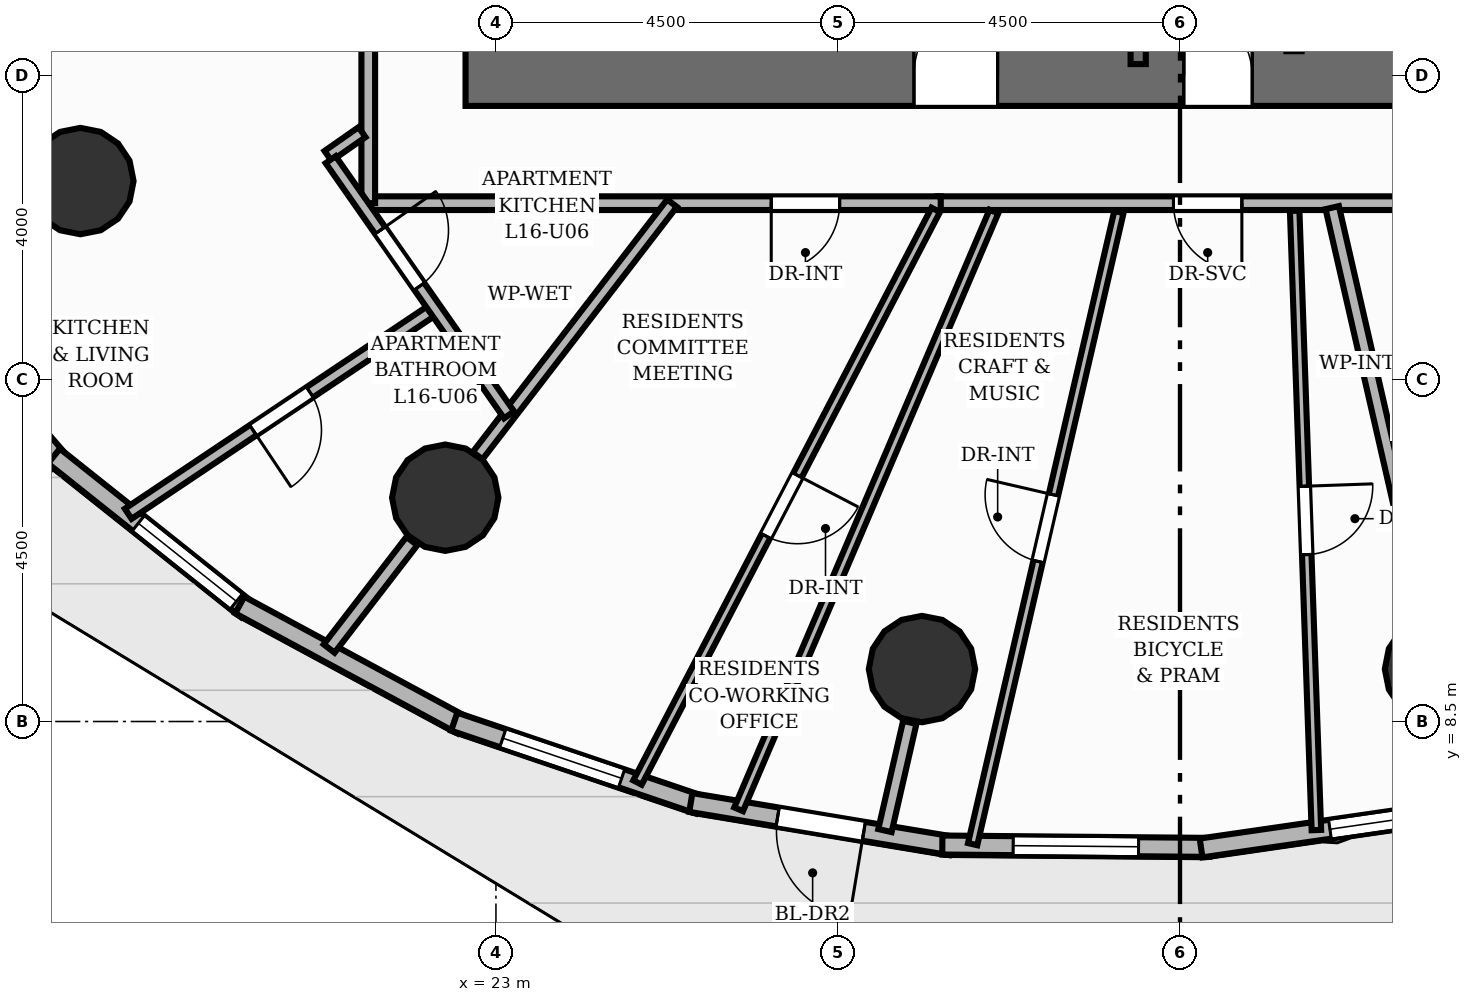
"""IFC4 building model, lengths in metres.
Left out: names, types, materials, properties, quantities, classifications, styles, units other than length and angle.
Written with IfcOpenShell. Run it as: python <this file> out.ifc"""

import sys

from ifc_helpers import new_model, si_unit, direction, frame, frame_2d, origin, origin_2d, place, context, subcontext, project, spatial, rectangle, circle, extrude, element, fill, save


model = new_model("IFC4")
c1 = context("Model", 3, precision=1e-05, world=origin(), true_north=direction((0.0, 1.0)))
c2 = subcontext(c1, "Body", "Model", "MODEL_VIEW")
j1 = project(units=[si_unit("LENGTHUNIT", "METRE"), si_unit("PLANEANGLEUNIT", "RADIAN")], contexts=[c1])
p1 = place(None, origin())
s1 = spatial("IfcSite", under=j1, at=p1, CompositionType="ELEMENT")
p2 = place(p1, origin())
s2 = spatial("IfcBuilding", under=s1, at=p2, CompositionType="ELEMENT")
p3 = place(p2, frame((0.0, 0.0, 56.8)))
s3 = spatial("IfcBuildingStorey", under=s2, at=p3, CompositionType="ELEMENT", Elevation=56.8)
p4 = place(p3, frame((22.6, 17.0, 0.0), z_axis=(0.0, 0.0, 1.0), x_axis=(1.0, 0.0, 0.0)))
e1 = element("IfcWall", 1, at=p4, inside=s3, PredefinedType="SHEAR", context=c2, shape_type="SweptSolid", body=[
    extrude(rectangle(XDim=18.8, YDim=0.8, at=frame_2d((9.4, 0.0))), origin(), (0.0, 0.0, 1.0), 3.2),
])
p5 = place(p4, frame((5.9, 0.0, 0.0)))
e2 = element("IfcOpeningElement", 2, at=p5, cuts=e1, PredefinedType="OPENING", context=c2, shape_type="SweptSolid", body=[
    extrude(rectangle(XDim=1.1, YDim=2.15, at=frame_2d((0.55, 1.075))), frame((0.0, 0.41, 0.0), z_axis=(0.0, -1.0, 0.0), x_axis=(1.0, 0.0, 0.0)), (0.0, 0.0, 1.0), 0.82),
])
p6 = place(p4, frame((9.45, 0.0, 0.0)))
e3 = element("IfcOpeningElement", 3, at=p6, cuts=e1, PredefinedType="OPENING", context=c2, shape_type="SweptSolid", body=[
    extrude(rectangle(XDim=0.9, YDim=2.1, at=frame_2d((0.45, 1.05))), frame((0.0, 0.41, 0.0), z_axis=(0.0, -1.0, 0.0), x_axis=(1.0, 0.0, 0.0)), (0.0, 0.0, 1.0), 0.82),
])
for number, where, z_axis, x_axis in (
    (4, (17.532, 15.611, 0.0), (0.0, 0.0, 1.0), (1.0, 0.0, 0.0)),
    (5, (22.333, 11.445, 0.0), (0.0, 0.0, 1.0), (1.0, 0.0, 0.0)),
    (6, (28.605, 9.19, 0.0), (0.0, 0.0, 1.0), (1.0, 0.0, 0.0)),
    (7, (35.395, 9.19, 0.0), (0.0, 0.0, 1.0), (1.0, 0.0, 0.0)),
):
    element("IfcColumn", number, at=place(p3, frame(where, z_axis=z_axis, x_axis=x_axis)), inside=s3, PredefinedType="COLUMN", context=c2, shape_type="SweptSolid", body=[
        extrude(circle(Radius=0.7, at=origin_2d()), origin(), (0.0, 0.0, 1.0), 3.2),
    ])
p7 = place(p3, frame((17.266, 11.914, 0.0), z_axis=(0.0, 0.0, 1.0), x_axis=(-0.653770062489, 0.75669327035, 0.0)))
e8 = element("IfcWall", 8, at=p7, inside=s3, PredefinedType="SOLIDWALL", context=c2, shape_type="SweptSolid", body=[
    extrude(rectangle(XDim=3.174, YDim=0.25, at=frame_2d((1.587, 0.0))), origin(), (0.0, 0.0, 1.0), 2.96),
])
p8 = place(p3, frame((19.722, 9.971, 0.0), z_axis=(0.0, 0.0, 1.0), x_axis=(-0.78232767864, 0.622867083119, 0.0)))
e9 = element("IfcWall", 9, at=p8, inside=s3, PredefinedType="SOLIDWALL", context=c2, shape_type="SweptSolid", body=[
    extrude(rectangle(XDim=3.244, YDim=0.25, at=frame_2d((1.622, 0.0))), origin(), (0.0, 0.0, 1.0), 2.96),
])
p9 = place(p8, frame((0.175, 0.0, 0.85)))
e10 = element("IfcOpeningElement", 10, at=p9, cuts=e9, PredefinedType="OPENING", context=c2, shape_type="SweptSolid", body=[
    extrude(rectangle(XDim=1.65, YDim=1.55, at=frame_2d((0.825, 0.775))), frame((0.0, 0.135, 0.0), z_axis=(0.0, -1.0, 0.0), x_axis=(1.0, 0.0, 0.0)), (0.0, 0.0, 1.0), 0.27),
])
p10 = place(p3, frame((22.552, 8.454, 0.0), z_axis=(0.0, 0.0, 1.0), x_axis=(-0.879811992908, 0.475321845843, 0.0)))
e11 = element("IfcWall", 11, at=p10, inside=s3, PredefinedType="SOLIDWALL", context=c2, shape_type="SweptSolid", body=[
    extrude(rectangle(XDim=3.323, YDim=0.25, at=frame_2d((1.661, 0.0))), origin(), (0.0, 0.0, 1.0), 2.96),
])
p11 = place(p3, frame((25.67, 7.407, 0.0), z_axis=(0.0, 0.0, 1.0), x_axis=(-0.947149503871, 0.320792483262, 0.0)))
e12 = element("IfcWall", 12, at=p11, inside=s3, PredefinedType="SOLIDWALL", context=c2, shape_type="SweptSolid", body=[
    extrude(rectangle(XDim=3.399, YDim=0.25, at=frame_2d((1.699, 0.0))), origin(), (0.0, 0.0, 1.0), 2.96),
])
p12 = place(p11, frame((1.074, 0.0, 0.85)))
e13 = element("IfcOpeningElement", 13, at=p12, cuts=e12, PredefinedType="OPENING", context=c2, shape_type="SweptSolid", body=[
    extrude(rectangle(XDim=1.65, YDim=1.55, at=frame_2d((0.825, 0.775))), frame((0.0, 0.135, 0.0), z_axis=(0.0, -1.0, 0.0), x_axis=(1.0, 0.0, 0.0)), (0.0, 0.0, 1.0), 0.27),
])
p13 = place(p3, frame((28.982, 6.865, 0.0), z_axis=(0.0, 0.0, 1.0), x_axis=(-0.986430084323, 0.164181877025, 0.0)))
e14 = element("IfcWall", 14, at=p13, inside=s3, PredefinedType="SOLIDWALL", context=c2, shape_type="SweptSolid", body=[
    extrude(rectangle(XDim=3.465, YDim=0.25, at=frame_2d((1.732, 0.0))), origin(), (0.0, 0.0, 1.0), 2.96),
])
p14 = place(p13, frame((1.157, 0.0, 0.0)))
e15 = element("IfcOpeningElement", 15, at=p14, cuts=e14, PredefinedType="OPENING", context=c2, shape_type="SweptSolid", body=[
    extrude(rectangle(XDim=1.15, YDim=2.01, at=frame_2d((0.575, 1.005))), frame((0.0, 0.135, 0.0), z_axis=(0.0, -1.0, 0.0), x_axis=(1.0, 0.0, 0.0)), (0.0, 0.0, 1.0), 0.27),
])
p15 = place(p3, frame((32.386, 6.844, 0.0), z_axis=(0.0, 0.0, 1.0), x_axis=(-0.999961046076, 0.008826456273, 0.0)))
e16 = element("IfcWall", 16, at=p15, inside=s3, PredefinedType="SOLIDWALL", context=c2, shape_type="SweptSolid", body=[
    extrude(rectangle(XDim=3.513, YDim=0.25, at=frame_2d((1.756, 0.0))), origin(), (0.0, 0.0, 1.0), 2.96),
])
p16 = place(p15, frame((0.931, 0.0, 0.85)))
e17 = element("IfcOpeningElement", 17, at=p16, cuts=e16, PredefinedType="OPENING", context=c2, shape_type="SweptSolid", body=[
    extrude(rectangle(XDim=1.65, YDim=1.55, at=frame_2d((0.825, 0.775))), frame((0.0, 0.135, 0.0), z_axis=(0.0, -1.0, 0.0), x_axis=(1.0, 0.0, 0.0)), (0.0, 0.0, 1.0), 0.27),
])
p17 = place(p3, frame((35.779, 7.344, 0.0), z_axis=(0.0, 0.0, 1.0), x_axis=(-0.989638017979, -0.143584795051, 0.0)))
e18 = element("IfcWall", 18, at=p17, inside=s3, PredefinedType="SOLIDWALL", context=c2, shape_type="SweptSolid", body=[
    extrude(rectangle(XDim=3.538, YDim=0.25, at=frame_2d((1.769, 0.0))), origin(), (0.0, 0.0, 1.0), 2.96),
])
p18 = place(p17, frame((0.175, 0.0, 0.85)))
e19 = element("IfcOpeningElement", 19, at=p18, cuts=e18, PredefinedType="OPENING", context=c2, shape_type="SweptSolid", body=[
    extrude(rectangle(XDim=1.65, YDim=1.29, at=frame_2d((0.825, 0.645))), frame((0.0, 0.135, 0.0), z_axis=(0.0, -1.0, 0.0), x_axis=(1.0, 0.0, 0.0)), (0.0, 0.0, 1.0), 0.27),
])
p19 = place(p3, frame((31.45, 17.15, 0.0), z_axis=(0.0, 0.0, 1.0), x_axis=(0.0, 1.0, 0.0)))
e20 = element("IfcWall", 20, at=p19, inside=s3, PredefinedType="SHEAR", context=c2, shape_type="SweptSolid", body=[
    extrude(rectangle(XDim=3.5, YDim=0.2, at=frame_2d((1.75, 0.0))), origin(), (0.0, 0.0, 1.0), 3.2),
])
p20 = place(p3, frame((21.894, 10.874, 0.0), z_axis=(0.0, 0.0, 1.0), x_axis=(-0.61002145357, -0.792384897752, 0.0)))
e21 = element("IfcWall", 21, at=p20, inside=s3, PredefinedType="PARTITIONING", context=c2, shape_type="SweptSolid", body=[
    extrude(rectangle(XDim=1.785, YDim=0.18, at=frame_2d((0.892, 0.0))), origin(), (0.0, 0.0, 1.0), 2.178),
])
p21 = place(p3, frame((28.445, 8.488, 0.0), z_axis=(0.0, 0.0, 1.0), x_axis=(-0.223491959946, -0.974705772959, 0.0)))
e22 = element("IfcWall", 22, at=p21, inside=s3, PredefinedType="PARTITIONING", context=c2, shape_type="SweptSolid", body=[
    extrude(rectangle(XDim=1.46, YDim=0.18, at=frame_2d((0.73, 0.0))), origin(), (0.0, 0.0, 1.0), 2.178),
])
p22 = place(p3, frame((42.68, 15.32, 0.0), z_axis=(0.0, 0.0, 1.0), x_axis=(-1.0, 0.0, 0.0)))
e23 = element("IfcWall", 23, at=p22, inside=s3, PredefinedType="PARTITIONING", context=c2, shape_type="SweptSolid", body=[
    extrude(rectangle(XDim=13.87, YDim=0.18, at=frame_2d((6.935, 0.0))), origin(), (0.0, 0.0, 1.0), 2.955),
])
p23 = place(p22, frame((9.866, 0.0, 0.0)))
e24 = element("IfcOpeningElement", 24, at=p23, cuts=e23, PredefinedType="OPENING", context=c2, shape_type="SweptSolid", body=[
    extrude(rectangle(XDim=0.9, YDim=2.1, at=frame_2d((0.45, 1.05))), frame((0.0, 0.1, 0.0), z_axis=(0.0, -1.0, 0.0), x_axis=(1.0, 0.0, 0.0)), (0.0, 0.0, 1.0), 0.2),
])
p24 = place(p3, frame((28.852, 15.32, 0.0), z_axis=(0.0, 0.0, 1.0), x_axis=(-1.0, 0.0, 0.0)))
e25 = element("IfcWall", 25, at=p24, inside=s3, PredefinedType="PARTITIONING", context=c2, shape_type="SweptSolid", body=[
    extrude(rectangle(XDim=7.532, YDim=0.18, at=frame_2d((3.766, 0.0))), origin(), (0.0, 0.0, 1.0), 2.955),
])
p25 = place(p24, frame((1.33, 0.0, 0.0)))
e26 = element("IfcOpeningElement", 26, at=p25, cuts=e25, PredefinedType="OPENING", context=c2, shape_type="SweptSolid", body=[
    extrude(rectangle(XDim=0.9, YDim=2.1, at=frame_2d((0.45, 1.05))), frame((0.0, 0.1, 0.0), z_axis=(0.0, -1.0, 0.0), x_axis=(1.0, 0.0, 0.0)), (0.0, 0.0, 1.0), 0.2),
])
p26 = place(p3, frame((21.32, 15.32, 0.0), z_axis=(0.0, 0.0, 1.0), x_axis=(0.0, 1.0, 0.0)))
e27 = element("IfcWall", 27, at=p26, inside=s3, PredefinedType="PARTITIONING", context=c2, shape_type="SweptSolid", body=[
    extrude(rectangle(XDim=4.947, YDim=0.18, at=frame_2d((2.474, 0.0))), origin(), (0.0, 0.0, 1.0), 2.955),
])
p27 = place(p26, frame((2.432, 0.0, 0.0)))
e28 = element("IfcOpeningElement", 28, at=p27, cuts=e27, PredefinedType="OPENING", context=c2, shape_type="SweptSolid", body=[
    extrude(rectangle(XDim=1.05, YDim=2.15, at=frame_2d((0.525, 1.075))), frame((0.0, 0.1, 0.0), z_axis=(0.0, -1.0, 0.0), x_axis=(1.0, 0.0, 0.0)), (0.0, 0.0, 1.0), 0.2),
])
p28 = place(p3, frame((33.509, 15.22, 0.0), z_axis=(0.0, 0.0, 1.0), x_axis=(0.035033610305, -0.999386134659, 0.0)))
e29 = element("IfcWall", 29, at=p28, inside=s3, PredefinedType="PARTITIONING", context=c2, shape_type="SweptSolid", body=[
    extrude(rectangle(XDim=8.154, YDim=0.125, at=frame_2d((4.077, 0.0))), origin(), (0.0, 0.0, 1.0), 2.955),
])
p29 = place(p28, frame((3.627, 0.0, 0.0)))
e30 = element("IfcOpeningElement", 30, at=p29, cuts=e29, PredefinedType="OPENING", context=c2, shape_type="SweptSolid", body=[
    extrude(rectangle(XDim=0.9, YDim=2.1, at=frame_2d((0.45, 1.05))), frame((0.0, 0.073, 0.0), z_axis=(0.0, -1.0, 0.0), x_axis=(1.0, 0.0, 0.0)), (0.0, 0.0, 1.0), 0.145),
])
p30 = place(p3, frame((29.272, 6.886, 0.0), z_axis=(0.0, 0.0, 1.0), x_axis=(0.225419243566, 0.974261856294, 0.0)))
e31 = element("IfcWall", 31, at=p30, inside=s3, PredefinedType="PARTITIONING", context=c2, shape_type="SweptSolid", body=[
    extrude(rectangle(XDim=8.537, YDim=0.125, at=frame_2d((4.268, 0.0))), origin(), (0.0, 0.0, 1.0), 2.641),
])
p31 = place(p30, frame((3.818, 0.0, 0.0)))
e32 = element("IfcOpeningElement", 32, at=p31, cuts=e31, PredefinedType="OPENING", context=c2, shape_type="SweptSolid", body=[
    extrude(rectangle(XDim=0.9, YDim=2.1, at=frame_2d((0.45, 1.05))), frame((0.0, 0.073, 0.0), z_axis=(0.0, -1.0, 0.0), x_axis=(1.0, 0.0, 0.0)), (0.0, 0.0, 1.0), 0.145),
])
p32 = place(p3, frame((28.786, 15.231, 0.0), z_axis=(0.0, 0.0, 1.0), x_axis=(-0.461913695099, -0.886924877473, 0.0)))
e33 = element("IfcWall", 33, at=p32, inside=s3, PredefinedType="PARTITIONING", context=c2, shape_type="SweptSolid", body=[
    extrude(rectangle(XDim=8.495, YDim=0.125, at=frame_2d((4.247, 0.0))), origin(), (0.0, 0.0, 1.0), 2.641),
])
p33 = place(p32, frame((3.938, 0.0, 0.0)))
e34 = element("IfcOpeningElement", 34, at=p33, cuts=e33, PredefinedType="OPENING", context=c2, shape_type="SweptSolid", body=[
    extrude(rectangle(XDim=0.9, YDim=2.1, at=frame_2d((0.45, 1.05))), frame((0.0, 0.073, 0.0), z_axis=(0.0, -1.0, 0.0), x_axis=(1.0, 0.0, 0.0)), (0.0, 0.0, 1.0), 0.145),
])
p34 = place(p3, frame((22.759, 11.998, 0.0), z_axis=(0.0, 0.0, 1.0), x_axis=(0.60996965366, 0.792424773473, 0.0)))
e35 = element("IfcWall", 35, at=p34, inside=s3, PredefinedType="PLUMBINGWALL", context=c2, shape_type="SweptSolid", body=[
    extrude(rectangle(XDim=4.192, YDim=0.16, at=frame_2d((2.096, 0.0))), origin(), (0.0, 0.0, 1.0), 2.178),
])
p35 = place(p3, frame((34.003, 15.261, 0.0), z_axis=(0.0, 0.0, 1.0), x_axis=(0.22340578764, -0.974725527546, 0.0)))
e36 = element("IfcWall", 36, at=p35, inside=s3, PredefinedType="PARTITIONING", context=c2, shape_type="SweptSolid", body=[
    extrude(rectangle(XDim=5.545, YDim=0.18, at=frame_2d((2.772, 0.0))), origin(), (0.0, 0.0, 1.0), 2.178),
])
p36 = place(p3, frame((26.193, 7.345, 0.0), z_axis=(0.0, 0.0, 1.0), x_axis=(0.392702721524, 0.919665467715, 0.0)))
e37 = element("IfcWall", 37, at=p36, inside=s3, PredefinedType="PARTITIONING", context=c2, shape_type="SweptSolid", body=[
    extrude(rectangle(XDim=8.552, YDim=0.125, at=frame_2d((4.276, 0.0))), origin(), (0.0, 0.0, 1.0), 2.955),
])
p37 = place(p3, frame((22.195, 13.933, 0.0), z_axis=(0.0, 0.0, 1.0), x_axis=(-0.831027380647, -0.556231509908, 0.0)))
e38 = element("IfcWall", 38, at=p37, inside=s3, PredefinedType="PLUMBINGWALL", context=c2, shape_type="SweptSolid", body=[
    extrude(rectangle(XDim=4.854, YDim=0.16, at=frame_2d((2.427, 0.0))), origin(), (0.0, 0.0, 1.0), 2.641),
])
p38 = place(p37, frame((1.977, 0.0, 0.0)))
e39 = element("IfcOpeningElement", 39, at=p38, cuts=e38, PredefinedType="OPENING", context=c2, shape_type="SweptSolid", body=[
    extrude(rectangle(XDim=0.9, YDim=2.1, at=frame_2d((0.45, 1.05))), frame((0.0, 0.09, 0.0), z_axis=(0.0, -1.0, 0.0), x_axis=(1.0, 0.0, 0.0)), (0.0, 0.0, 1.0), 0.18),
])
p39 = place(p3, frame((21.238, 16.254, 0.0), z_axis=(0.0, 0.0, 1.0), x_axis=(-0.819589255208, -0.572951527398, 0.0)))
e40 = element("IfcWall", 40, at=p39, inside=s3, PredefinedType="PLUMBINGWALL", context=c2, shape_type="SweptSolid", body=[
    extrude(rectangle(XDim=0.545, YDim=0.16, at=frame_2d((0.273, 0.0))), origin(), (0.0, 0.0, 1.0), 2.955),
])
p40 = place(p3, frame((20.825, 15.893, 0.0), z_axis=(0.0, 0.0, 1.0), x_axis=(0.572966263624, -0.819578953334, 0.0)))
e41 = element("IfcWall", 41, at=p40, inside=s3, PredefinedType="PLUMBINGWALL", context=c2, shape_type="SweptSolid", body=[
    extrude(rectangle(XDim=4.096, YDim=0.16, at=frame_2d((2.048, 0.0))), origin(), (0.0, 0.0, 1.0), 2.955),
])
p41 = place(p40, frame((1.135, 0.0, 0.0)))
e42 = element("IfcOpeningElement", 42, at=p41, cuts=e41, PredefinedType="OPENING", context=c2, shape_type="SweptSolid", body=[
    extrude(rectangle(XDim=0.9, YDim=2.1, at=frame_2d((0.45, 1.05))), frame((0.0, 0.09, 0.0), z_axis=(0.0, -1.0, 0.0), x_axis=(1.0, 0.0, 0.0)), (0.0, 0.0, 1.0), 0.18),
])
p42 = place(p14, origin())
e43 = element("IfcDoor", 43, at=p42, inside=s3, OperationType="SINGLE_SWING_LEFT", PredefinedType="DOOR", context=c2, shape_type="SweptSolid", body=[
    extrude(rectangle(XDim=1.15, YDim=2.01, at=frame_2d((0.575, 1.005))), frame((0.0, 0.025, 0.0), z_axis=(0.0, -1.0, 0.0), x_axis=(1.0, 0.0, 0.0)), (0.0, 0.0, 1.0), 0.05),
])
fill(e15, e43)
p43 = place(p9, origin())
e44 = element("IfcWindow", 44, at=p43, inside=s3, PartitioningType="SINGLE_PANEL", PredefinedType="WINDOW", context=c2, shape_type="SweptSolid", body=[
    extrude(rectangle(XDim=1.65, YDim=1.55, at=frame_2d((0.825, 0.775))), frame((0.0, 0.03, 0.0), z_axis=(0.0, -1.0, 0.0), x_axis=(1.0, 0.0, 0.0)), (0.0, 0.0, 1.0), 0.06),
])
fill(e10, e44)
p44 = place(p12, origin())
e45 = element("IfcWindow", 45, at=p44, inside=s3, PartitioningType="SINGLE_PANEL", PredefinedType="WINDOW", context=c2, shape_type="SweptSolid", body=[
    extrude(rectangle(XDim=1.65, YDim=1.55, at=frame_2d((0.825, 0.775))), frame((0.0, 0.03, 0.0), z_axis=(0.0, -1.0, 0.0), x_axis=(1.0, 0.0, 0.0)), (0.0, 0.0, 1.0), 0.06),
])
fill(e13, e45)
p45 = place(p16, origin())
e46 = element("IfcWindow", 46, at=p45, inside=s3, PartitioningType="SINGLE_PANEL", PredefinedType="WINDOW", context=c2, shape_type="SweptSolid", body=[
    extrude(rectangle(XDim=1.65, YDim=1.55, at=frame_2d((0.825, 0.775))), frame((0.0, 0.03, 0.0), z_axis=(0.0, -1.0, 0.0), x_axis=(1.0, 0.0, 0.0)), (0.0, 0.0, 1.0), 0.06),
])
fill(e17, e46)
p46 = place(p18, origin())
e47 = element("IfcWindow", 47, at=p46, inside=s3, PartitioningType="SINGLE_PANEL", PredefinedType="WINDOW", context=c2, shape_type="SweptSolid", body=[
    extrude(rectangle(XDim=1.65, YDim=1.29, at=frame_2d((0.825, 0.645))), frame((0.0, 0.03, 0.0), z_axis=(0.0, -1.0, 0.0), x_axis=(1.0, 0.0, 0.0)), (0.0, 0.0, 1.0), 0.06),
])
fill(e19, e47)
p47 = place(p5, origin())
e48 = element("IfcDoor", 48, at=p47, inside=s3, OperationType="SINGLE_SWING_RIGHT", PredefinedType="DOOR", context=c2, shape_type="SweptSolid", body=[
    extrude(rectangle(XDim=1.1, YDim=2.15, at=frame_2d((0.55, 1.075))), frame((0.0, 0.025, 0.0), z_axis=(0.0, -1.0, 0.0), x_axis=(1.0, 0.0, 0.0)), (0.0, 0.0, 1.0), 0.05),
])
fill(e2, e48)
p48 = place(p6, origin())
e49 = element("IfcDoor", 49, at=p48, inside=s3, OperationType="SINGLE_SWING_LEFT", PredefinedType="DOOR", context=c2, shape_type="SweptSolid", body=[
    extrude(rectangle(XDim=0.9, YDim=2.1, at=frame_2d((0.45, 1.05))), frame((0.0, 0.025, 0.0), z_axis=(0.0, -1.0, 0.0), x_axis=(1.0, 0.0, 0.0)), (0.0, 0.0, 1.0), 0.05),
])
fill(e3, e49)
p49 = place(p23, origin())
e50 = element("IfcDoor", 50, at=p49, inside=s3, OperationType="SINGLE_SWING_LEFT", PredefinedType="DOOR", context=c2, shape_type="SweptSolid", body=[
    extrude(rectangle(XDim=0.9, YDim=2.1, at=frame_2d((0.45, 1.05))), frame((0.0, 0.025, 0.0), z_axis=(0.0, -1.0, 0.0), x_axis=(1.0, 0.0, 0.0)), (0.0, 0.0, 1.0), 0.05),
])
fill(e24, e50)
p50 = place(p25, origin())
e51 = element("IfcDoor", 51, at=p50, inside=s3, OperationType="SINGLE_SWING_RIGHT", PredefinedType="DOOR", context=c2, shape_type="SweptSolid", body=[
    extrude(rectangle(XDim=0.9, YDim=2.1, at=frame_2d((0.45, 1.05))), frame((0.0, 0.025, 0.0), z_axis=(0.0, -1.0, 0.0), x_axis=(1.0, 0.0, 0.0)), (0.0, 0.0, 1.0), 0.05),
])
fill(e26, e51)
p51 = place(p29, origin())
e52 = element("IfcDoor", 52, at=p51, inside=s3, OperationType="SINGLE_SWING_LEFT", PredefinedType="DOOR", context=c2, shape_type="SweptSolid", body=[
    extrude(rectangle(XDim=0.9, YDim=2.1, at=frame_2d((0.45, 1.05))), frame((0.0, 0.025, 0.0), z_axis=(0.0, -1.0, 0.0), x_axis=(1.0, 0.0, 0.0)), (0.0, 0.0, 1.0), 0.05),
])
fill(e30, e52)
p52 = place(p31, origin())
e53 = element("IfcDoor", 53, at=p52, inside=s3, OperationType="SINGLE_SWING_RIGHT", PredefinedType="DOOR", context=c2, shape_type="SweptSolid", body=[
    extrude(rectangle(XDim=0.9, YDim=2.1, at=frame_2d((0.45, 1.05))), frame((0.0, 0.025, 0.0), z_axis=(0.0, -1.0, 0.0), x_axis=(1.0, 0.0, 0.0)), (0.0, 0.0, 1.0), 0.05),
])
fill(e32, e53)
p53 = place(p33, origin())
e54 = element("IfcDoor", 54, at=p53, inside=s3, OperationType="SINGLE_SWING_LEFT", PredefinedType="DOOR", context=c2, shape_type="SweptSolid", body=[
    extrude(rectangle(XDim=0.9, YDim=2.1, at=frame_2d((0.45, 1.05))), frame((0.0, 0.025, 0.0), z_axis=(0.0, -1.0, 0.0), x_axis=(1.0, 0.0, 0.0)), (0.0, 0.0, 1.0), 0.05),
])
fill(e34, e54)
p54 = place(p38, origin())
e55 = element("IfcDoor", 55, at=p54, inside=s3, OperationType="SINGLE_SWING_RIGHT", PredefinedType="DOOR", context=c2, shape_type="SweptSolid", body=[
    extrude(rectangle(XDim=0.9, YDim=2.1, at=frame_2d((0.45, 1.05))), frame((0.0, 0.025, 0.0), z_axis=(0.0, -1.0, 0.0), x_axis=(1.0, 0.0, 0.0)), (0.0, 0.0, 1.0), 0.05),
])
fill(e39, e55)
p55 = place(p41, origin())
e56 = element("IfcDoor", 56, at=p55, inside=s3, OperationType="SINGLE_SWING_LEFT", PredefinedType="DOOR", context=c2, shape_type="SweptSolid", body=[
    extrude(rectangle(XDim=0.9, YDim=2.1, at=frame_2d((0.45, 1.05))), frame((0.0, 0.025, 0.0), z_axis=(0.0, -1.0, 0.0), x_axis=(1.0, 0.0, 0.0)), (0.0, 0.0, 1.0), 0.05),
])
fill(e42, e56)
save(model, sys.argv[1])
